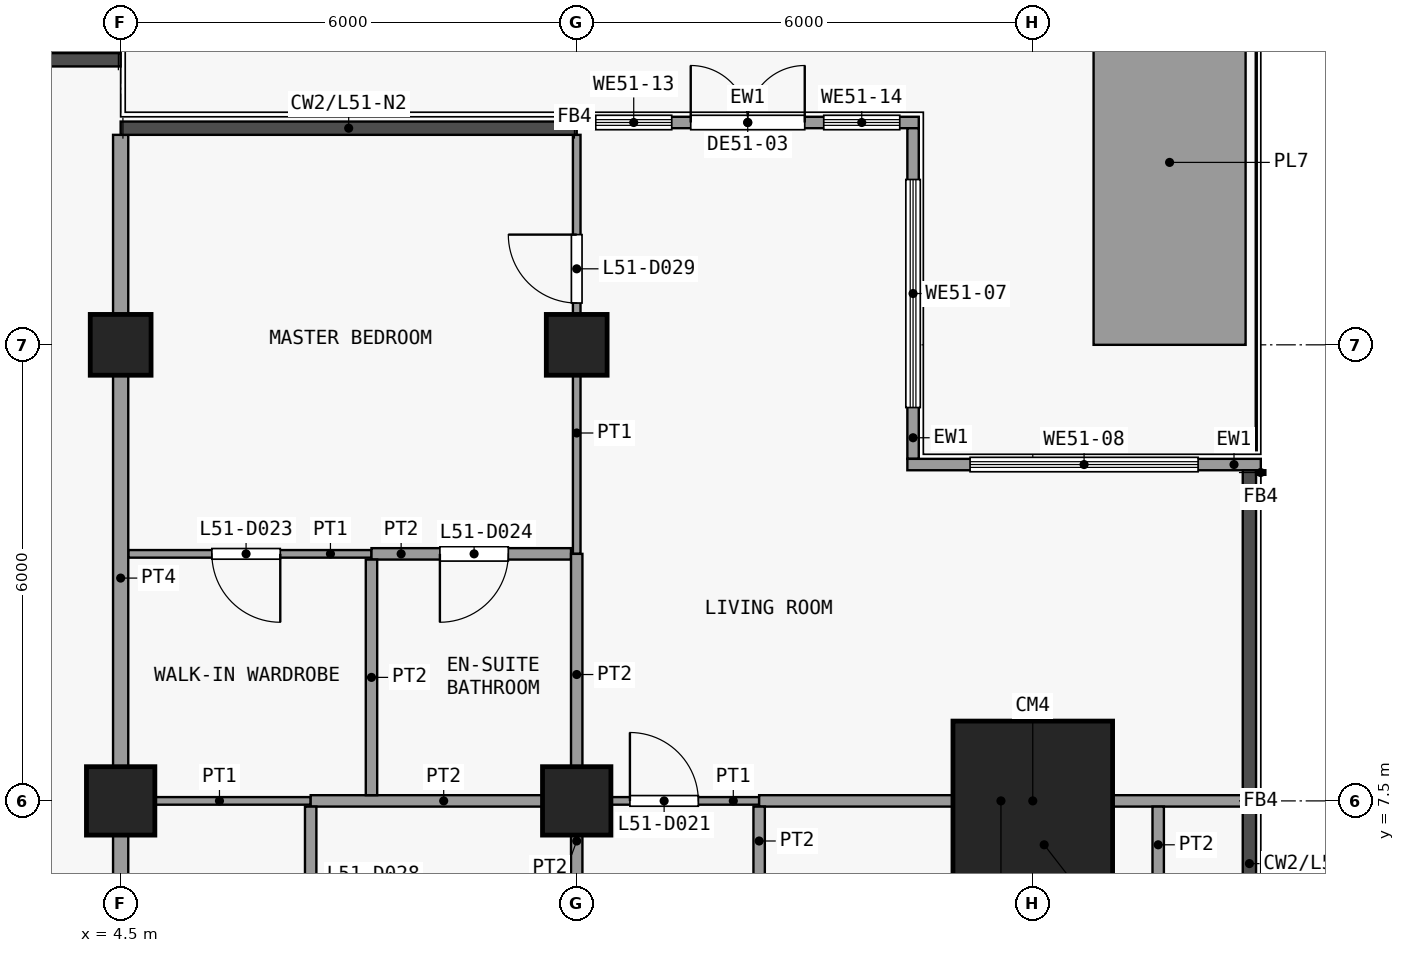
"""IFC4 building model, lengths in metres.
Left out: names, types, materials, properties, quantities, classifications, styles, units other than length and angle.
Written with IfcOpenShell. Run it as: python <this file> out.ifc"""

import sys

from ifc_helpers import new_model, si_unit, direction, frame, frame_2d, origin, origin_2d, place, context, subcontext, project, spatial, rectangle, extrude, element, fill, save


model = new_model("IFC4")
c1 = context("Model", 3, precision=1e-05, world=origin(), true_north=direction((0.0, 1.0)))
c2 = subcontext(c1, "Body", "Model", "MODEL_VIEW")
j1 = project(units=[si_unit("LENGTHUNIT", "METRE"), si_unit("PLANEANGLEUNIT", "RADIAN")], contexts=[c1])
p1 = place(None, origin())
s1 = spatial("IfcSite", under=j1, at=p1, CompositionType="ELEMENT")
p2 = place(p1, origin())
s2 = spatial("IfcBuilding", under=s1, at=p2, CompositionType="ELEMENT")
p3 = place(p2, frame((0.0, 0.0, 205.1)))
s3 = spatial("IfcBuildingStorey", under=s2, at=p3, CompositionType="ELEMENT", Elevation=205.1)
p4 = place(p3, frame((4.5, 7.5, 0.0), z_axis=(0.0, 0.0, 1.0), x_axis=(1.0, 0.0, 0.0)))
e1 = element("IfcColumn", 1, at=p4, inside=s3, PredefinedType="COLUMN", context=c2, shape_type="SweptSolid", body=[
    extrude(rectangle(XDim=0.9, YDim=0.9, at=origin_2d()), origin(), (0.0, 0.0, 1.0), 3.6),
])
p5 = place(p3, frame((4.5, 13.5, 0.0), z_axis=(0.0, 0.0, 1.0), x_axis=(1.0, 0.0, 0.0)))
e2 = element("IfcColumn", 2, at=p5, inside=s3, PredefinedType="COLUMN", context=c2, shape_type="SweptSolid", body=[
    extrude(rectangle(XDim=0.8, YDim=0.8, at=origin_2d()), origin(), (0.0, 0.0, 1.0), 3.6),
])
p6 = place(p3, frame((10.5, 7.5, 0.0), z_axis=(0.0, 0.0, 1.0), x_axis=(1.0, 0.0, 0.0)))
e3 = element("IfcColumn", 3, at=p6, inside=s3, PredefinedType="COLUMN", context=c2, shape_type="SweptSolid", body=[
    extrude(rectangle(XDim=0.9, YDim=0.9, at=origin_2d()), origin(), (0.0, 0.0, 1.0), 3.6),
])
p7 = place(p3, frame((10.5, 13.5, 0.0), z_axis=(0.0, 0.0, 1.0), x_axis=(1.0, 0.0, 0.0)))
e4 = element("IfcColumn", 4, at=p7, inside=s3, PredefinedType="COLUMN", context=c2, shape_type="SweptSolid", body=[
    extrude(rectangle(XDim=0.8, YDim=0.8, at=origin_2d()), origin(), (0.0, 0.0, 1.0), 3.6),
])
p8 = place(p3, frame((16.5, 7.5, 0.0), z_axis=(0.0, 0.0, 1.0), x_axis=(1.0, 0.0, 0.0)))
e5 = element("IfcColumn", 5, at=p8, inside=s3, PredefinedType="COLUMN", context=c2, shape_type="SweptSolid", body=[
    extrude(rectangle(XDim=2.1, YDim=2.1, at=origin_2d()), origin(), (0.0, 0.0, 1.0), 3.6),
])
p9 = place(p3, frame((14.925, 16.35, 0.0), z_axis=(0.0, 0.0, 1.0), x_axis=(0.0, -1.0, 0.0)))
e6 = element("IfcWall", 6, at=p9, inside=s3, PredefinedType="SOLIDWALL", context=c2, shape_type="SweptSolid", body=[
    extrude(rectangle(XDim=4.35, YDim=0.15, at=frame_2d((2.175, 0.0))), origin(), (0.0, 0.0, 1.0), 3.3),
])
p10 = place(p9, frame((0.675, 0.0, 0.9)))
e7 = element("IfcOpeningElement", 7, at=p10, cuts=e6, PredefinedType="OPENING", context=c2, shape_type="SweptSolid", body=[
    extrude(rectangle(XDim=3.0, YDim=2.4, at=frame_2d((1.5, 1.2))), frame((0.0, 0.085, 0.0), z_axis=(0.0, -1.0, 0.0), x_axis=(1.0, 0.0, 0.0)), (0.0, 0.0, 1.0), 0.17),
])
p11 = place(p3, frame((14.85, 11.925, 0.0), z_axis=(0.0, 0.0, 1.0), x_axis=(1.0, 0.0, 0.0)))
e8 = element("IfcWall", 8, at=p11, inside=s3, PredefinedType="SOLIDWALL", context=c2, shape_type="SweptSolid", body=[
    extrude(rectangle(XDim=4.65, YDim=0.15, at=frame_2d((2.325, 0.0))), origin(), (0.0, 0.0, 1.0), 3.3),
])
p12 = place(p11, frame((0.825, 0.0, 0.9)))
e9 = element("IfcOpeningElement", 9, at=p12, cuts=e8, PredefinedType="OPENING", context=c2, shape_type="SweptSolid", body=[
    extrude(rectangle(XDim=3.0, YDim=2.4, at=frame_2d((1.5, 1.2))), frame((0.0, 0.085, 0.0), z_axis=(0.0, -1.0, 0.0), x_axis=(1.0, 0.0, 0.0)), (0.0, 0.0, 1.0), 0.17),
])
p13 = place(p3, frame((10.5, 16.425, 0.0), z_axis=(0.0, 0.0, 1.0), x_axis=(1.0, 0.0, 0.0)))
e10 = element("IfcWall", 10, at=p13, inside=s3, PredefinedType="SOLIDWALL", context=c2, shape_type="SweptSolid", body=[
    extrude(rectangle(XDim=4.5, YDim=0.15, at=frame_2d((2.25, 0.0))), origin(), (0.0, 0.0, 1.0), 3.3),
])
p14 = place(p13, frame((1.5, 0.0, 0.0)))
e11 = element("IfcOpeningElement", 11, at=p14, cuts=e10, PredefinedType="OPENING", context=c2, shape_type="SweptSolid", body=[
    extrude(rectangle(XDim=1.5, YDim=2.4, at=frame_2d((0.75, 1.2))), frame((0.0, 0.085, 0.0), z_axis=(0.0, -1.0, 0.0), x_axis=(1.0, 0.0, 0.0)), (0.0, 0.0, 1.0), 0.17),
])
p15 = place(p13, frame((0.25, 0.0, 0.9)))
e12 = element("IfcOpeningElement", 12, at=p15, cuts=e10, PredefinedType="OPENING", context=c2, shape_type="SweptSolid", body=[
    extrude(rectangle(XDim=1.0, YDim=2.1, at=frame_2d((0.5, 1.05))), frame((0.0, 0.085, 0.0), z_axis=(0.0, -1.0, 0.0), x_axis=(1.0, 0.0, 0.0)), (0.0, 0.0, 1.0), 0.17),
])
p16 = place(p13, frame((3.25, 0.0, 0.9)))
e13 = element("IfcOpeningElement", 13, at=p16, cuts=e10, PredefinedType="OPENING", context=c2, shape_type="SweptSolid", body=[
    extrude(rectangle(XDim=1.0, YDim=2.1, at=frame_2d((0.5, 1.05))), frame((0.0, 0.085, 0.0), z_axis=(0.0, -1.0, 0.0), x_axis=(1.0, 0.0, 0.0)), (0.0, 0.0, 1.0), 0.17),
])
p17 = place(p3, frame((18.3, 13.5, 0.0), z_axis=(0.0, 0.0, 1.0), x_axis=(0.0, 1.0, 0.0)))
e14 = element("IfcWall", 14, at=p17, inside=s3, PredefinedType="USERDEFINED", context=c2, shape_type="SweptSolid", body=[
    extrude(rectangle(XDim=4.8, YDim=2.0, at=frame_2d((2.4, 0.0))), origin(), (0.0, 0.0, 1.0), 0.9),
])
p18 = place(p3, frame((4.6, 7.5, 0.0), z_axis=(0.0, 0.0, 1.0), x_axis=(1.0, 0.0, 0.0)))
e15 = element("IfcWall", 15, at=p18, inside=s3, PredefinedType="PARTITIONING", context=c2, shape_type="SweptSolid", body=[
    extrude(rectangle(XDim=2.4, YDim=0.1, at=frame_2d((1.2, 0.0))), origin(), (0.0, 0.0, 1.0), 3.3),
])
p19 = place(p3, frame((10.5, 7.5, 0.0), z_axis=(0.0, 0.0, 1.0), x_axis=(1.0, 0.0, 0.0)))
e16 = element("IfcWall", 16, at=p19, inside=s3, PredefinedType="PARTITIONING", context=c2, shape_type="SweptSolid", body=[
    extrude(rectangle(XDim=2.4, YDim=0.1, at=frame_2d((1.2, 0.0))), origin(), (0.0, 0.0, 1.0), 3.3),
])
p20 = place(p19, frame((0.7, 0.0, 0.0)))
e17 = element("IfcOpeningElement", 17, at=p20, cuts=e16, PredefinedType="OPENING", context=c2, shape_type="SweptSolid", body=[
    extrude(rectangle(XDim=0.9, YDim=2.1, at=frame_2d((0.45, 1.05))), frame((0.0, 0.06, 0.0), z_axis=(0.0, -1.0, 0.0), x_axis=(1.0, 0.0, 0.0)), (0.0, 0.0, 1.0), 0.12),
])
p21 = place(p3, frame((7.0, 7.5, 0.0), z_axis=(0.0, 0.0, 1.0), x_axis=(1.0, 0.0, 0.0)))
e18 = element("IfcWall", 18, at=p21, inside=s3, PredefinedType="PARTITIONING", context=c2, shape_type="SweptSolid", body=[
    extrude(rectangle(XDim=3.5, YDim=0.15, at=frame_2d((1.75, 0.0))), origin(), (0.0, 0.0, 1.0), 3.3),
])
p22 = place(p3, frame((12.9, 7.5, 0.0), z_axis=(0.0, 0.0, 1.0), x_axis=(1.0, 0.0, 0.0)))
e19 = element("IfcWall", 19, at=p22, inside=s3, PredefinedType="PARTITIONING", context=c2, shape_type="SweptSolid", body=[
    extrude(rectangle(XDim=6.363, YDim=0.15, at=frame_2d((3.181, 0.0))), origin(), (0.0, 0.0, 1.0), 3.3),
])
p23 = place(p3, frame((4.6, 10.75, 0.0), z_axis=(0.0, 0.0, 1.0), x_axis=(1.0, 0.0, 0.0)))
e20 = element("IfcWall", 20, at=p23, inside=s3, PredefinedType="PARTITIONING", context=c2, shape_type="SweptSolid", body=[
    extrude(rectangle(XDim=3.2, YDim=0.1, at=frame_2d((1.6, 0.0))), origin(), (0.0, 0.0, 1.0), 3.3),
])
p24 = place(p23, frame((1.1, 0.0, 0.0)))
e21 = element("IfcOpeningElement", 21, at=p24, cuts=e20, PredefinedType="OPENING", context=c2, shape_type="SweptSolid", body=[
    extrude(rectangle(XDim=0.9, YDim=2.1, at=frame_2d((0.45, 1.05))), frame((0.0, 0.06, 0.0), z_axis=(0.0, -1.0, 0.0), x_axis=(1.0, 0.0, 0.0)), (0.0, 0.0, 1.0), 0.12),
])
p25 = place(p3, frame((7.8, 10.75, 0.0), z_axis=(0.0, 0.0, 1.0), x_axis=(1.0, 0.0, 0.0)))
e22 = element("IfcWall", 22, at=p25, inside=s3, PredefinedType="PARTITIONING", context=c2, shape_type="SweptSolid", body=[
    extrude(rectangle(XDim=2.625, YDim=0.15, at=frame_2d((1.312, 0.0))), origin(), (0.0, 0.0, 1.0), 3.3),
])
p26 = place(p25, frame((0.9, 0.0, 0.0)))
e23 = element("IfcOpeningElement", 23, at=p26, cuts=e22, PredefinedType="OPENING", context=c2, shape_type="SweptSolid", body=[
    extrude(rectangle(XDim=0.9, YDim=2.1, at=frame_2d((0.45, 1.05))), frame((0.0, 0.085, 0.0), z_axis=(0.0, -1.0, 0.0), x_axis=(1.0, 0.0, 0.0)), (0.0, 0.0, 1.0), 0.17),
])
p27 = place(p3, frame((4.5, 4.6, 0.0), z_axis=(0.0, 0.0, 1.0), x_axis=(0.0, 1.0, 0.0)))
e24 = element("IfcWall", 24, at=p27, inside=s3, PredefinedType="PARTITIONING", context=c2, shape_type="SweptSolid", body=[
    extrude(rectangle(XDim=11.662, YDim=0.2, at=frame_2d((5.831, 0.0))), origin(), (0.0, 0.0, 1.0), 3.3),
])
p28 = place(p3, frame((7.0, 4.6, 0.0), z_axis=(0.0, 0.0, 1.0), x_axis=(0.0, 1.0, 0.0)))
e25 = element("IfcWall", 25, at=p28, inside=s3, PredefinedType="PARTITIONING", context=c2, shape_type="SweptSolid", body=[
    extrude(rectangle(XDim=2.825, YDim=0.15, at=frame_2d((1.413, 0.0))), origin(), (0.0, 0.0, 1.0), 3.3),
])
p29 = place(p28, frame((1.0, 0.0, 0.0)))
e26 = element("IfcOpeningElement", 26, at=p29, cuts=e25, PredefinedType="OPENING", context=c2, shape_type="SweptSolid", body=[
    extrude(rectangle(XDim=0.9, YDim=2.1, at=frame_2d((0.45, 1.05))), frame((0.0, 0.085, 0.0), z_axis=(0.0, -1.0, 0.0), x_axis=(1.0, 0.0, 0.0)), (0.0, 0.0, 1.0), 0.17),
])
p30 = place(p3, frame((7.8, 7.575, 0.0), z_axis=(0.0, 0.0, 1.0), x_axis=(0.0, 1.0, 0.0)))
e27 = element("IfcWall", 27, at=p30, inside=s3, PredefinedType="PARTITIONING", context=c2, shape_type="SweptSolid", body=[
    extrude(rectangle(XDim=3.1, YDim=0.15, at=frame_2d((1.55, 0.0))), origin(), (0.0, 0.0, 1.0), 3.3),
])
p31 = place(p3, frame((10.5, 10.75, 0.0), z_axis=(0.0, 0.0, 1.0), x_axis=(0.0, 1.0, 0.0)))
e28 = element("IfcWall", 28, at=p31, inside=s3, PredefinedType="PARTITIONING", context=c2, shape_type="SweptSolid", body=[
    extrude(rectangle(XDim=5.512, YDim=0.1, at=frame_2d((2.756, 0.0))), origin(), (0.0, 0.0, 1.0), 3.3),
])
p32 = place(p31, frame((3.3, 0.0, 0.0)))
e29 = element("IfcOpeningElement", 29, at=p32, cuts=e28, PredefinedType="OPENING", context=c2, shape_type="SweptSolid", body=[
    extrude(rectangle(XDim=0.9, YDim=2.1, at=frame_2d((0.45, 1.05))), frame((0.0, 0.06, 0.0), z_axis=(0.0, -1.0, 0.0), x_axis=(1.0, 0.0, 0.0)), (0.0, 0.0, 1.0), 0.12),
])
p33 = place(p3, frame((10.5, 4.6, 0.0), z_axis=(0.0, 0.0, 1.0), x_axis=(0.0, 1.0, 0.0)))
e30 = element("IfcWall", 30, at=p33, inside=s3, PredefinedType="PARTITIONING", context=c2, shape_type="SweptSolid", body=[
    extrude(rectangle(XDim=2.825, YDim=0.15, at=frame_2d((1.413, 0.0))), origin(), (0.0, 0.0, 1.0), 3.3),
])
p34 = place(p33, frame((0.9, 0.0, 0.0)))
e31 = element("IfcOpeningElement", 31, at=p34, cuts=e30, PredefinedType="OPENING", context=c2, shape_type="SweptSolid", body=[
    extrude(rectangle(XDim=0.9, YDim=2.1, at=frame_2d((0.45, 1.05))), frame((0.0, 0.085, 0.0), z_axis=(0.0, -1.0, 0.0), x_axis=(1.0, 0.0, 0.0)), (0.0, 0.0, 1.0), 0.17),
])
p35 = place(p3, frame((10.5, 7.575, 0.0), z_axis=(0.0, 0.0, 1.0), x_axis=(0.0, 1.0, 0.0)))
e32 = element("IfcWall", 32, at=p35, inside=s3, PredefinedType="PARTITIONING", context=c2, shape_type="SweptSolid", body=[
    extrude(rectangle(XDim=3.175, YDim=0.15, at=frame_2d((1.587, 0.0))), origin(), (0.0, 0.0, 1.0), 3.3),
])
p36 = place(p3, frame((12.9, 4.6, 0.0), z_axis=(0.0, 0.0, 1.0), x_axis=(0.0, 1.0, 0.0)))
e33 = element("IfcWall", 33, at=p36, inside=s3, PredefinedType="PARTITIONING", context=c2, shape_type="SweptSolid", body=[
    extrude(rectangle(XDim=2.825, YDim=0.15, at=frame_2d((1.413, 0.0))), origin(), (0.0, 0.0, 1.0), 3.3),
])
p37 = place(p36, frame((0.9, 0.0, 0.0)))
e34 = element("IfcOpeningElement", 34, at=p37, cuts=e33, PredefinedType="OPENING", context=c2, shape_type="SweptSolid", body=[
    extrude(rectangle(XDim=0.9, YDim=2.1, at=frame_2d((0.45, 1.05))), frame((0.0, 0.085, 0.0), z_axis=(0.0, -1.0, 0.0), x_axis=(1.0, 0.0, 0.0)), (0.0, 0.0, 1.0), 0.17),
])
p38 = place(p3, frame((16.65, 4.6, 0.0), z_axis=(0.0, 0.0, 1.0), x_axis=(0.0, 1.0, 0.0)))
e35 = element("IfcWall", 35, at=p38, inside=s3, PredefinedType="PARTITIONING", context=c2, shape_type="SweptSolid", body=[
    extrude(rectangle(XDim=2.825, YDim=0.15, at=frame_2d((1.413, 0.0))), origin(), (0.0, 0.0, 1.0), 3.3),
])
p39 = place(p38, frame((0.8, 0.0, 0.0)))
e36 = element("IfcOpeningElement", 36, at=p39, cuts=e35, PredefinedType="OPENING", context=c2, shape_type="SweptSolid", body=[
    extrude(rectangle(XDim=0.9, YDim=2.1, at=frame_2d((0.45, 1.05))), frame((0.0, 0.085, 0.0), z_axis=(0.0, -1.0, 0.0), x_axis=(1.0, 0.0, 0.0)), (0.0, 0.0, 1.0), 0.17),
])
p40 = place(p3, frame((18.15, 4.6, 0.0), z_axis=(0.0, 0.0, 1.0), x_axis=(0.0, 1.0, 0.0)))
e37 = element("IfcWall", 37, at=p40, inside=s3, PredefinedType="PARTITIONING", context=c2, shape_type="SweptSolid", body=[
    extrude(rectangle(XDim=2.825, YDim=0.15, at=frame_2d((1.413, 0.0))), origin(), (0.0, 0.0, 1.0), 3.3),
])
p41 = place(p40, frame((0.8, 0.0, 0.0)))
e38 = element("IfcOpeningElement", 38, at=p41, cuts=e37, PredefinedType="OPENING", context=c2, shape_type="SweptSolid", body=[
    extrude(rectangle(XDim=0.9, YDim=2.1, at=frame_2d((0.45, 1.05))), frame((0.0, 0.085, 0.0), z_axis=(0.0, -1.0, 0.0), x_axis=(1.0, 0.0, 0.0)), (0.0, 0.0, 1.0), 0.17),
])
p42 = place(p10, origin())
e39 = element("IfcWindow", 39, at=p42, inside=s3, PartitioningType="SINGLE_PANEL", PredefinedType="WINDOW", context=c2, shape_type="SweptSolid", body=[
    extrude(rectangle(XDim=3.0, YDim=2.4, at=frame_2d((1.5, 1.2))), frame((0.0, 0.03, 0.0), z_axis=(0.0, -1.0, 0.0), x_axis=(1.0, 0.0, 0.0)), (0.0, 0.0, 1.0), 0.06),
])
fill(e7, e39)
p43 = place(p12, origin())
e40 = element("IfcWindow", 40, at=p43, inside=s3, PartitioningType="SINGLE_PANEL", PredefinedType="WINDOW", context=c2, shape_type="SweptSolid", body=[
    extrude(rectangle(XDim=3.0, YDim=2.4, at=frame_2d((1.5, 1.2))), frame((0.0, 0.03, 0.0), z_axis=(0.0, -1.0, 0.0), x_axis=(1.0, 0.0, 0.0)), (0.0, 0.0, 1.0), 0.06),
])
fill(e9, e40)
p44 = place(p14, origin())
e41 = element("IfcDoor", 41, at=p44, inside=s3, OperationType="DOUBLE_DOOR_SINGLE_SWING", PredefinedType="DOOR", context=c2, shape_type="SweptSolid", body=[
    extrude(rectangle(XDim=1.5, YDim=2.4, at=frame_2d((0.75, 1.2))), frame((0.0, 0.025, 0.0), z_axis=(0.0, -1.0, 0.0), x_axis=(1.0, 0.0, 0.0)), (0.0, 0.0, 1.0), 0.05),
])
fill(e11, e41)
p45 = place(p15, origin())
e42 = element("IfcWindow", 42, at=p45, inside=s3, PartitioningType="SINGLE_PANEL", PredefinedType="WINDOW", context=c2, shape_type="SweptSolid", body=[
    extrude(rectangle(XDim=1.0, YDim=2.1, at=frame_2d((0.5, 1.05))), frame((0.0, 0.03, 0.0), z_axis=(0.0, -1.0, 0.0), x_axis=(1.0, 0.0, 0.0)), (0.0, 0.0, 1.0), 0.06),
])
fill(e12, e42)
p46 = place(p16, origin())
e43 = element("IfcWindow", 43, at=p46, inside=s3, PartitioningType="SINGLE_PANEL", PredefinedType="WINDOW", context=c2, shape_type="SweptSolid", body=[
    extrude(rectangle(XDim=1.0, YDim=2.1, at=frame_2d((0.5, 1.05))), frame((0.0, 0.03, 0.0), z_axis=(0.0, -1.0, 0.0), x_axis=(1.0, 0.0, 0.0)), (0.0, 0.0, 1.0), 0.06),
])
fill(e13, e43)
p47 = place(p20, origin())
e44 = element("IfcDoor", 44, at=p47, inside=s3, OperationType="SINGLE_SWING_RIGHT", PredefinedType="DOOR", context=c2, shape_type="SweptSolid", body=[
    extrude(rectangle(XDim=0.9, YDim=2.1, at=frame_2d((0.45, 1.05))), frame((0.0, 0.025, 0.0), z_axis=(0.0, -1.0, 0.0), x_axis=(1.0, 0.0, 0.0)), (0.0, 0.0, 1.0), 0.05),
])
fill(e17, e44)
p48 = place(p24, origin())
e45 = element("IfcDoor", 45, at=p48, inside=s3, OperationType="SINGLE_SWING_RIGHT", PredefinedType="DOOR", context=c2, shape_type="SweptSolid", body=[
    extrude(rectangle(XDim=0.9, YDim=2.1, at=frame_2d((0.45, 1.05))), frame((0.0, 0.025, 0.0), z_axis=(0.0, -1.0, 0.0), x_axis=(1.0, 0.0, 0.0)), (0.0, 0.0, 1.0), 0.05),
])
fill(e21, e45)
p49 = place(p26, origin())
e46 = element("IfcDoor", 46, at=p49, inside=s3, OperationType="SINGLE_SWING_LEFT", PredefinedType="DOOR", context=c2, shape_type="SweptSolid", body=[
    extrude(rectangle(XDim=0.9, YDim=2.1, at=frame_2d((0.45, 1.05))), frame((0.0, 0.025, 0.0), z_axis=(0.0, -1.0, 0.0), x_axis=(1.0, 0.0, 0.0)), (0.0, 0.0, 1.0), 0.05),
])
fill(e23, e46)
p50 = place(p32, origin())
e47 = element("IfcDoor", 47, at=p50, inside=s3, OperationType="SINGLE_SWING_LEFT", PredefinedType="DOOR", context=c2, shape_type="SweptSolid", body=[
    extrude(rectangle(XDim=0.9, YDim=2.1, at=frame_2d((0.45, 1.05))), frame((0.0, 0.025, 0.0), z_axis=(0.0, -1.0, 0.0), x_axis=(1.0, 0.0, 0.0)), (0.0, 0.0, 1.0), 0.05),
])
fill(e29, e47)
save(model, sys.argv[1])
